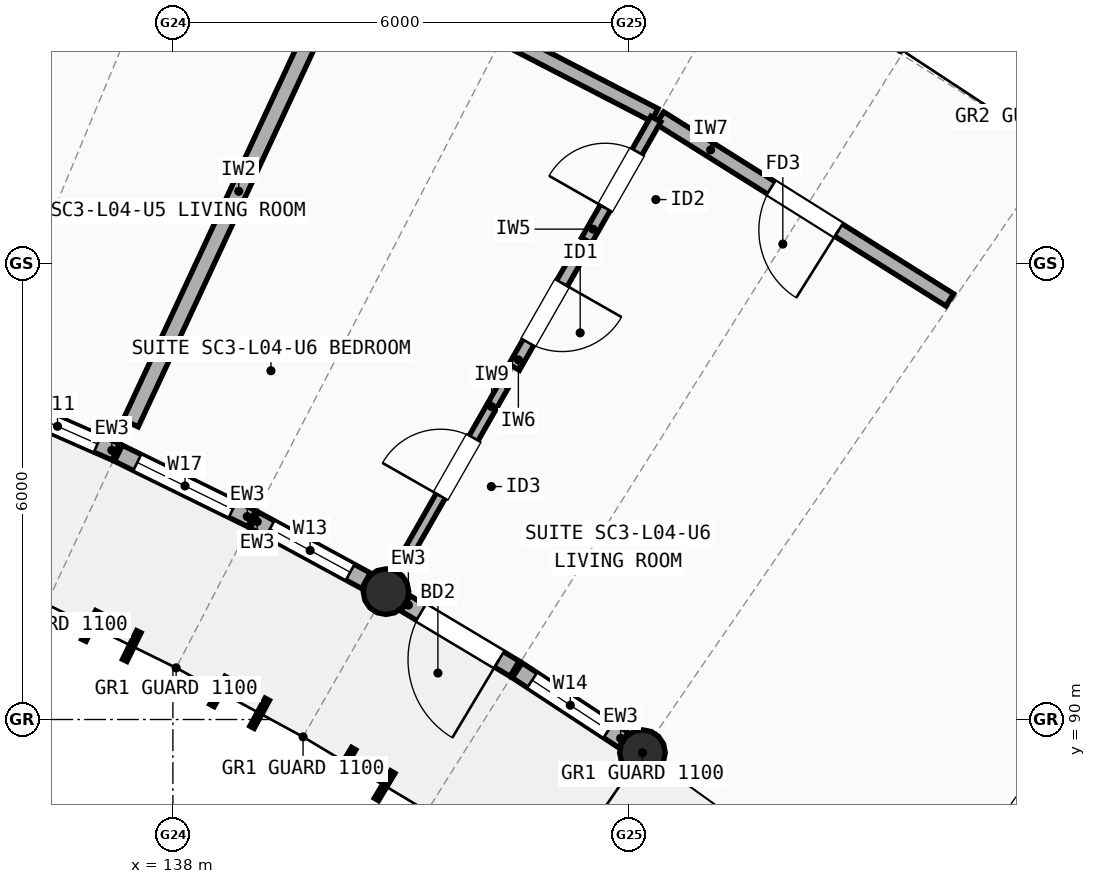
"""IFC4 building model, lengths in metres.
Left out: names, types, materials, properties, quantities, classifications, styles, units other than length and angle.
Written with IfcOpenShell. Run it as: python <this file> out.ifc"""

import sys

from ifc_helpers import new_model, si_unit, direction, frame, frame_2d, origin, origin_2d, place, context, subcontext, project, spatial, rectangle, circle, extrude, element, fill, save


model = new_model("IFC4")
c1 = context("Model", 3, precision=1e-05, world=origin(), true_north=direction((0.0, 1.0)))
c2 = subcontext(c1, "Body", "Model", "MODEL_VIEW")
j1 = project(units=[si_unit("LENGTHUNIT", "METRE"), si_unit("PLANEANGLEUNIT", "RADIAN")], contexts=[c1])
p1 = place(None, origin())
s1 = spatial("IfcSite", under=j1, at=p1, CompositionType="ELEMENT")
p2 = place(p1, origin())
s2 = spatial("IfcBuilding", under=s1, at=p2, CompositionType="ELEMENT")
p3 = place(p2, frame((0.0, 0.0, 14.1)))
s3 = spatial("IfcBuildingStorey", under=s2, at=p3, CompositionType="ELEMENT", Elevation=14.1)
for number, where, z_axis, x_axis in (
    (1, (140.804, 91.682, 0.0), (0.0, 0.0, 1.0), (1.0, 0.0, 0.0)),
    (2, (144.178, 89.564, 0.0), (0.0, 0.0, 1.0), (1.0, 0.0, 0.0)),
):
    element("IfcColumn", number, at=place(p3, frame(where, z_axis=z_axis, x_axis=x_axis)), inside=s3, PredefinedType="COLUMN", context=c2, shape_type="SweptSolid", body=[
        extrude(circle(Radius=0.3, at=origin_2d()), origin(), (0.0, 0.0, 1.0), 2.948),
    ])
p4 = place(p3, frame((135.717, 94.195, 0.0), z_axis=(0.0, 0.0, 1.0), x_axis=(0.915095317091, -0.403237598246, 0.0)))
e3 = element("IfcWall", 3, at=p4, inside=s3, PredefinedType="STANDARD", context=c2, shape_type="SweptSolid", body=[
    extrude(rectangle(XDim=1.672, YDim=0.235, at=frame_2d((0.836, 0.0))), origin(), (0.0, 0.0, 1.0), 2.684),
])
p5 = place(p4, frame((0.261, 0.0, 0.85)))
e4 = element("IfcOpeningElement", 4, at=p5, cuts=e3, PredefinedType="OPENING", context=c2, shape_type="SweptSolid", body=[
    extrude(rectangle(XDim=1.15, YDim=1.45, at=frame_2d((0.575, 0.725))), frame((0.0, 0.127, 0.0), z_axis=(0.0, -1.0, 0.0), x_axis=(1.0, 0.0, 0.0)), (0.0, 0.0, 1.0), 0.255),
])
p6 = place(p3, frame((137.283, 93.503, 0.0), z_axis=(0.0, 0.0, 1.0), x_axis=(0.897531751182, -0.44094983345, 0.0)))
e5 = element("IfcWall", 5, at=p6, inside=s3, PredefinedType="STANDARD", context=c2, shape_type="SweptSolid", body=[
    extrude(rectangle(XDim=1.952, YDim=0.235, at=frame_2d((0.976, 0.0))), origin(), (0.0, 0.0, 1.0), 2.684),
])
p7 = place(p6, frame((0.276, 0.0, 0.85)))
e6 = element("IfcOpeningElement", 6, at=p7, cuts=e5, PredefinedType="OPENING", context=c2, shape_type="SweptSolid", body=[
    extrude(rectangle(XDim=1.4, YDim=1.5, at=frame_2d((0.7, 0.75))), frame((0.0, 0.127, 0.0), z_axis=(0.0, -1.0, 0.0), x_axis=(1.0, 0.0, 0.0)), (0.0, 0.0, 1.0), 0.255),
])
p8 = place(p3, frame((139.071, 92.624, 0.0), z_axis=(0.0, 0.0, 1.0), x_axis=(0.878447349235, -0.477839151412, 0.0)))
e7 = element("IfcWall", 7, at=p8, inside=s3, PredefinedType="STANDARD", context=c2, shape_type="SweptSolid", body=[
    extrude(rectangle(XDim=1.672, YDim=0.235, at=frame_2d((0.836, 0.0))), origin(), (0.0, 0.0, 1.0), 2.684),
])
p9 = place(p8, frame((0.236, 0.0, 0.85)))
e8 = element("IfcOpeningElement", 8, at=p9, cuts=e7, PredefinedType="OPENING", context=c2, shape_type="SweptSolid", body=[
    extrude(rectangle(XDim=1.2, YDim=1.45, at=frame_2d((0.6, 0.725))), frame((0.0, 0.127, 0.0), z_axis=(0.0, -1.0, 0.0), x_axis=(1.0, 0.0, 0.0)), (0.0, 0.0, 1.0), 0.255),
])
p10 = place(p3, frame((141.061, 91.528, 0.0), z_axis=(0.0, 0.0, 1.0), x_axis=(0.857853402967, -0.513894482377, 0.0)))
e9 = element("IfcWall", 9, at=p10, inside=s3, PredefinedType="STANDARD", context=c2, shape_type="SweptSolid", body=[
    extrude(rectangle(XDim=1.672, YDim=0.235, at=frame_2d((0.836, 0.0))), origin(), (0.0, 0.0, 1.0), 2.684),
])
p11 = place(p10, frame((0.236, 0.0, 0.0)))
e10 = element("IfcOpeningElement", 10, at=p11, cuts=e9, PredefinedType="OPENING", context=c2, shape_type="SweptSolid", body=[
    extrude(rectangle(XDim=1.2, YDim=2.15, at=frame_2d((0.6, 1.075))), frame((0.0, 0.127, 0.0), z_axis=(0.0, -1.0, 0.0), x_axis=(1.0, 0.0, 0.0)), (0.0, 0.0, 1.0), 0.255),
])
p12 = place(p3, frame((142.53, 90.647, 0.0), z_axis=(0.0, 0.0, 1.0), x_axis=(0.83589302699, -0.548892382375, 0.0)))
e11 = element("IfcWall", 11, at=p12, inside=s3, PredefinedType="STANDARD", context=c2, shape_type="SweptSolid", body=[
    extrude(rectangle(XDim=1.672, YDim=0.235, at=frame_2d((0.836, 0.0))), origin(), (0.0, 0.0, 1.0), 2.684),
])
p13 = place(p12, frame((0.236, 0.0, 0.85)))
e12 = element("IfcOpeningElement", 12, at=p13, cuts=e11, PredefinedType="OPENING", context=c2, shape_type="SweptSolid", body=[
    extrude(rectangle(XDim=1.2, YDim=1.5, at=frame_2d((0.6, 0.75))), frame((0.0, 0.127, 0.0), z_axis=(0.0, -1.0, 0.0), x_axis=(1.0, 0.0, 0.0)), (0.0, 0.0, 1.0), 0.255),
])
p14 = place(p3, frame((137.444, 93.897, 0.0), z_axis=(0.0, 0.0, 1.0), x_axis=(0.422206763189, 0.906499558256, 0.0)))
e13 = element("IfcWall", 13, at=p14, inside=s3, PredefinedType="SOLIDWALL", context=c2, shape_type="SweptSolid", body=[
    extrude(rectangle(XDim=6.736, YDim=0.22, at=frame_2d((3.368, 0.0))), origin(), (0.0, 0.0, 1.0), 2.742),
])
p15 = place(p3, frame((140.34, 100.021, 0.0), z_axis=(0.0, 0.0, 1.0), x_axis=(0.888214590482, -0.459428820662, 0.0)))
e14 = element("IfcWall", 14, at=p15, inside=s3, PredefinedType="SOLIDWALL", context=c2, shape_type="SweptSolid", body=[
    extrude(rectangle(XDim=4.501, YDim=0.19, at=frame_2d((2.251, 0.0))), origin(), (0.0, 0.0, 1.0), 2.762),
])
p16 = place(p3, frame((144.408, 97.913, 0.0), z_axis=(0.0, 0.0, 1.0), x_axis=(0.847037081085, -0.531533802563, 0.0)))
e15 = element("IfcWall", 15, at=p16, inside=s3, PredefinedType="SOLIDWALL", context=c2, shape_type="SweptSolid", body=[
    extrude(rectangle(XDim=4.501, YDim=0.19, at=frame_2d((2.25, 0.0))), origin(), (0.0, 0.0, 1.0), 2.742),
])
p17 = place(p16, frame((1.726, 0.0, 0.0)))
e16 = element("IfcOpeningElement", 16, at=p17, cuts=e15, PredefinedType="OPENING", context=c2, shape_type="SweptSolid", body=[
    extrude(rectangle(XDim=1.05, YDim=2.15, at=frame_2d((0.525, 1.075))), frame((0.0, 0.105, 0.0), z_axis=(0.0, -1.0, 0.0), x_axis=(1.0, 0.0, 0.0)), (0.0, 0.0, 1.0), 0.21),
])
p18 = place(p3, frame((141.125, 92.245, 0.0), z_axis=(0.0, 0.0, 1.0), x_axis=(0.49594810138, 0.868352164008, 0.0)))
e17 = element("IfcWall", 17, at=p18, inside=s3, PredefinedType="PARTITIONING", context=c2, shape_type="SweptSolid", body=[
    extrude(rectangle(XDim=2.48, YDim=0.135, at=frame_2d((1.24, 0.0))), origin(), (0.0, 0.0, 1.0), 2.722),
])
p19 = place(p18, frame((0.8, 0.0, 0.0)))
e18 = element("IfcOpeningElement", 18, at=p19, cuts=e17, PredefinedType="OPENING", context=c2, shape_type="SweptSolid", body=[
    extrude(rectangle(XDim=0.88, YDim=2.1, at=frame_2d((0.44, 1.05))), frame((0.0, 0.077, 0.0), z_axis=(0.0, -1.0, 0.0), x_axis=(1.0, 0.0, 0.0)), (0.0, 0.0, 1.0), 0.155),
])
p20 = place(p3, frame((142.49, 94.635, 0.0), z_axis=(0.0, 0.0, 1.0), x_axis=(0.49583578404, 0.868416302971, 0.0)))
e19 = element("IfcWall", 19, at=p20, inside=s3, PredefinedType="PLUMBINGWALL", context=c2, shape_type="SweptSolid", body=[
    extrude(rectangle(XDim=1.648, YDim=0.16, at=frame_2d((0.824, 0.0))), origin(), (0.0, 0.0, 1.0), 2.722),
])
p21 = place(p20, frame((0.374, 0.0, 0.0)))
e20 = element("IfcOpeningElement", 20, at=p21, cuts=e19, PredefinedType="OPENING", context=c2, shape_type="SweptSolid", body=[
    extrude(rectangle(XDim=0.9, YDim=2.1, at=frame_2d((0.45, 1.05))), frame((0.0, 0.09, 0.0), z_axis=(0.0, -1.0, 0.0), x_axis=(1.0, 0.0, 0.0)), (0.0, 0.0, 1.0), 0.18),
])
p22 = place(p3, frame((143.442, 96.302, 0.0), z_axis=(0.0, 0.0, 1.0), x_axis=(0.495938892217, 0.868357423638, 0.0)))
e21 = element("IfcWall", 21, at=p22, inside=s3, PredefinedType="PARTITIONING", context=c2, shape_type="SweptSolid", body=[
    extrude(rectangle(XDim=1.84, YDim=0.15, at=frame_2d((0.92, 0.0))), origin(), (0.0, 0.0, 1.0), 2.722),
])
p23 = place(p22, frame((0.495, 0.0, 0.0)))
e22 = element("IfcOpeningElement", 22, at=p23, cuts=e21, PredefinedType="OPENING", context=c2, shape_type="SweptSolid", body=[
    extrude(rectangle(XDim=0.85, YDim=2.1, at=frame_2d((0.425, 1.05))), frame((0.0, 0.085, 0.0), z_axis=(0.0, -1.0, 0.0), x_axis=(1.0, 0.0, 0.0)), (0.0, 0.0, 1.0), 0.17),
])
p24 = place(p5, origin())
e23 = element("IfcWindow", 23, at=p24, inside=s3, PartitioningType="SINGLE_PANEL", PredefinedType="WINDOW", context=c2, shape_type="SweptSolid", body=[
    extrude(rectangle(XDim=1.15, YDim=1.45, at=frame_2d((0.575, 0.725))), frame((0.0, 0.03, 0.0), z_axis=(0.0, -1.0, 0.0), x_axis=(1.0, 0.0, 0.0)), (0.0, 0.0, 1.0), 0.06),
])
fill(e4, e23)
p25 = place(p7, origin())
e24 = element("IfcWindow", 24, at=p25, inside=s3, PartitioningType="SINGLE_PANEL", PredefinedType="WINDOW", context=c2, shape_type="SweptSolid", body=[
    extrude(rectangle(XDim=1.4, YDim=1.5, at=frame_2d((0.7, 0.75))), frame((0.0, 0.03, 0.0), z_axis=(0.0, -1.0, 0.0), x_axis=(1.0, 0.0, 0.0)), (0.0, 0.0, 1.0), 0.06),
])
fill(e6, e24)
p26 = place(p9, origin())
e25 = element("IfcWindow", 25, at=p26, inside=s3, PartitioningType="SINGLE_PANEL", PredefinedType="WINDOW", context=c2, shape_type="SweptSolid", body=[
    extrude(rectangle(XDim=1.2, YDim=1.45, at=frame_2d((0.6, 0.725))), frame((0.0, 0.03, 0.0), z_axis=(0.0, -1.0, 0.0), x_axis=(1.0, 0.0, 0.0)), (0.0, 0.0, 1.0), 0.06),
])
fill(e8, e25)
p27 = place(p11, frame((1.2, 0.0, 0.0), z_axis=(0.0, 0.0, 1.0), x_axis=(-1.0, 0.0, 0.0)))
e26 = element("IfcDoor", 26, at=p27, inside=s3, OperationType="SINGLE_SWING_RIGHT", PredefinedType="DOOR", context=c2, shape_type="SweptSolid", body=[
    extrude(rectangle(XDim=1.2, YDim=2.15, at=frame_2d((0.6, 1.075))), frame((0.0, 0.025, 0.0), z_axis=(0.0, -1.0, 0.0), x_axis=(1.0, 0.0, 0.0)), (0.0, 0.0, 1.0), 0.05),
])
fill(e10, e26)
p28 = place(p13, origin())
e27 = element("IfcWindow", 27, at=p28, inside=s3, PartitioningType="SINGLE_PANEL", PredefinedType="WINDOW", context=c2, shape_type="SweptSolid", body=[
    extrude(rectangle(XDim=1.2, YDim=1.5, at=frame_2d((0.6, 0.75))), frame((0.0, 0.03, 0.0), z_axis=(0.0, -1.0, 0.0), x_axis=(1.0, 0.0, 0.0)), (0.0, 0.0, 1.0), 0.06),
])
fill(e12, e27)
p29 = place(p17, origin())
e28 = element("IfcDoor", 28, at=p29, inside=s3, OperationType="SINGLE_SWING_RIGHT", PredefinedType="DOOR", context=c2, shape_type="SweptSolid", body=[
    extrude(rectangle(XDim=1.05, YDim=2.15, at=frame_2d((0.525, 1.075))), frame((0.0, 0.025, 0.0), z_axis=(0.0, -1.0, 0.0), x_axis=(1.0, 0.0, 0.0)), (0.0, 0.0, 1.0), 0.05),
])
fill(e16, e28)
p30 = place(p19, origin())
e29 = element("IfcDoor", 29, at=p30, inside=s3, OperationType="SINGLE_SWING_LEFT", PredefinedType="DOOR", context=c2, shape_type="SweptSolid", body=[
    extrude(rectangle(XDim=0.88, YDim=2.1, at=frame_2d((0.44, 1.05))), frame((0.0, 0.025, 0.0), z_axis=(0.0, -1.0, 0.0), x_axis=(1.0, 0.0, 0.0)), (0.0, 0.0, 1.0), 0.05),
])
fill(e18, e29)
p31 = place(p21, origin())
e30 = element("IfcDoor", 30, at=p31, inside=s3, OperationType="SINGLE_SWING_RIGHT", PredefinedType="DOOR", context=c2, shape_type="SweptSolid", body=[
    extrude(rectangle(XDim=0.9, YDim=2.1, at=frame_2d((0.45, 1.05))), frame((0.0, 0.025, 0.0), z_axis=(0.0, -1.0, 0.0), x_axis=(1.0, 0.0, 0.0)), (0.0, 0.0, 1.0), 0.05),
])
fill(e20, e30)
p32 = place(p23, origin())
e31 = element("IfcDoor", 31, at=p32, inside=s3, OperationType="SINGLE_SWING_LEFT", PredefinedType="DOOR", context=c2, shape_type="SweptSolid", body=[
    extrude(rectangle(XDim=0.85, YDim=2.1, at=frame_2d((0.425, 1.05))), frame((0.0, 0.025, 0.0), z_axis=(0.0, -1.0, 0.0), x_axis=(1.0, 0.0, 0.0)), (0.0, 0.0, 1.0), 0.05),
])
fill(e22, e31)
save(model, sys.argv[1])
